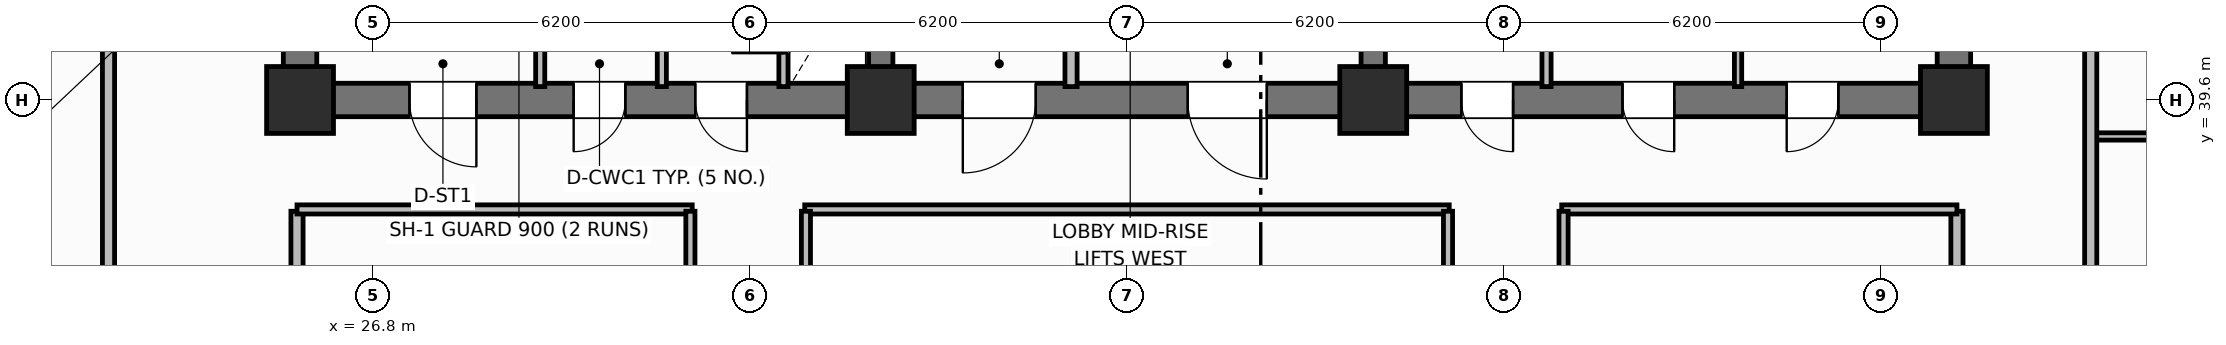
"""IFC4 building model, lengths in metres.
Left out: names, types, materials, properties, quantities, classifications, styles, units other than length and angle.
Written with IfcOpenShell. Run it as: python <this file> out.ifc"""

import sys

from ifc_helpers import new_model, si_unit, direction, frame, frame_2d, origin, origin_2d, place, context, subcontext, project, spatial, rectangle, extrude, element, fill, save


model = new_model("IFC4")
c1 = context("Model", 3, precision=1e-05, world=origin(), true_north=direction((0.0, 1.0)))
c2 = subcontext(c1, "Body", "Model", "MODEL_VIEW")
j1 = project(units=[si_unit("LENGTHUNIT", "METRE"), si_unit("PLANEANGLEUNIT", "RADIAN")], contexts=[c1])
p1 = place(None, origin())
s1 = spatial("IfcSite", under=j1, at=p1, CompositionType="ELEMENT")
p2 = place(p1, origin())
s2 = spatial("IfcBuilding", under=s1, at=p2, CompositionType="ELEMENT")
p3 = place(p2, frame((0.0, 0.0, 129.0)))
s3 = spatial("IfcBuildingStorey", under=s2, at=p3, CompositionType="ELEMENT", Elevation=129.0)
for number, where, z_axis, x_axis in (
    (1, (25.6, 39.875, 0.0), (0.0, 0.0, 1.0), (0.0, 1.0, 0.0)),
    (2, (52.8, 39.875, 0.0), (0.0, 0.0, 1.0), (0.0, 1.0, 0.0)),
):
    element("IfcWall", number, at=place(p3, frame(where, z_axis=z_axis, x_axis=x_axis)), inside=s3, PredefinedType="SHEAR", context=c2, shape_type="SweptSolid", body=[
        extrude(rectangle(XDim=5.65, YDim=0.55, at=frame_2d((2.825, 0.0))), origin(), (0.0, 0.0, 1.0), 3.7),
    ])
p4 = place(p3, frame((52.8, 39.6, 0.0), z_axis=(0.0, 0.0, 1.0), x_axis=(-1.0, 0.0, 0.0)))
e3 = element("IfcWall", 3, at=p4, inside=s3, PredefinedType="SHEAR", context=c2, shape_type="SweptSolid", body=[
    extrude(rectangle(XDim=27.2, YDim=0.55, at=frame_2d((13.6, 0.0))), origin(), (0.0, 0.0, 1.0), 3.7),
])
p5 = place(p4, frame((24.3, 0.0, 0.0)))
e4 = element("IfcOpeningElement", 4, at=p5, cuts=e3, PredefinedType="OPENING", context=c2, shape_type="SweptSolid", body=[
    extrude(rectangle(XDim=1.1, YDim=2.15, at=frame_2d((0.55, 1.075))), frame((0.0, 0.285, 0.0), z_axis=(0.0, -1.0, 0.0), x_axis=(1.0, 0.0, 0.0)), (0.0, 0.0, 1.0), 0.57),
])
p6 = place(p4, frame((21.85, 0.0, 0.0)))
e5 = element("IfcOpeningElement", 5, at=p6, cuts=e3, PredefinedType="OPENING", context=c2, shape_type="SweptSolid", body=[
    extrude(rectangle(XDim=0.85, YDim=2.1, at=frame_2d((0.425, 1.05))), frame((0.0, 0.285, 0.0), z_axis=(0.0, -1.0, 0.0), x_axis=(1.0, 0.0, 0.0)), (0.0, 0.0, 1.0), 0.57),
])
p7 = place(p4, frame((19.85, 0.0, 0.0)))
e6 = element("IfcOpeningElement", 6, at=p7, cuts=e3, PredefinedType="OPENING", context=c2, shape_type="SweptSolid", body=[
    extrude(rectangle(XDim=0.85, YDim=2.1, at=frame_2d((0.425, 1.05))), frame((0.0, 0.285, 0.0), z_axis=(0.0, -1.0, 0.0), x_axis=(1.0, 0.0, 0.0)), (0.0, 0.0, 1.0), 0.57),
])
p8 = place(p4, frame((15.1, 0.0, 0.0)))
e7 = element("IfcOpeningElement", 7, at=p8, cuts=e3, PredefinedType="OPENING", context=c2, shape_type="SweptSolid", body=[
    extrude(rectangle(XDim=1.2, YDim=2.15, at=frame_2d((0.6, 1.075))), frame((0.0, 0.285, 0.0), z_axis=(0.0, -1.0, 0.0), x_axis=(1.0, 0.0, 0.0)), (0.0, 0.0, 1.0), 0.57),
])
p9 = place(p4, frame((11.3, 0.0, 0.0)))
e8 = element("IfcOpeningElement", 8, at=p9, cuts=e3, PredefinedType="OPENING", context=c2, shape_type="SweptSolid", body=[
    extrude(rectangle(XDim=1.3, YDim=2.2, at=frame_2d((0.65, 1.1))), frame((0.0, 0.285, 0.0), z_axis=(0.0, -1.0, 0.0), x_axis=(1.0, 0.0, 0.0)), (0.0, 0.0, 1.0), 0.57),
])
p10 = place(p4, frame((7.25, 0.0, 0.0)))
e9 = element("IfcOpeningElement", 9, at=p10, cuts=e3, PredefinedType="OPENING", context=c2, shape_type="SweptSolid", body=[
    extrude(rectangle(XDim=0.85, YDim=2.1, at=frame_2d((0.425, 1.05))), frame((0.0, 0.285, 0.0), z_axis=(0.0, -1.0, 0.0), x_axis=(1.0, 0.0, 0.0)), (0.0, 0.0, 1.0), 0.57),
])
p11 = place(p4, frame((4.6, 0.0, 0.0)))
e10 = element("IfcOpeningElement", 10, at=p11, cuts=e3, PredefinedType="OPENING", context=c2, shape_type="SweptSolid", body=[
    extrude(rectangle(XDim=0.85, YDim=2.1, at=frame_2d((0.425, 1.05))), frame((0.0, 0.285, 0.0), z_axis=(0.0, -1.0, 0.0), x_axis=(1.0, 0.0, 0.0)), (0.0, 0.0, 1.0), 0.57),
])
p12 = place(p4, frame((1.9, 0.0, 0.0)))
e11 = element("IfcOpeningElement", 11, at=p12, cuts=e3, PredefinedType="OPENING", context=c2, shape_type="SweptSolid", body=[
    extrude(rectangle(XDim=0.85, YDim=2.1, at=frame_2d((0.425, 1.05))), frame((0.0, 0.285, 0.0), z_axis=(0.0, -1.0, 0.0), x_axis=(1.0, 0.0, 0.0)), (0.0, 0.0, 1.0), 0.57),
])
for number, where, z_axis, x_axis in (
    (12, (35.15, 39.875, 0.0), (0.0, 0.0, 1.0), (0.0, 1.0, 0.0)),
    (13, (43.25, 39.875, 0.0), (0.0, 0.0, 1.0), (0.0, 1.0, 0.0)),
):
    element("IfcWall", number, at=place(p3, frame(where, z_axis=z_axis, x_axis=x_axis)), inside=s3, PredefinedType="SHEAR", context=c2, shape_type="SweptSolid", body=[
        extrude(rectangle(XDim=5.65, YDim=0.4, at=frame_2d((2.825, 0.0))), origin(), (0.0, 0.0, 1.0), 3.7),
    ])
for number, where, z_axis, x_axis in (
    (14, (25.6, 39.6, 0.0), (0.0, 0.0, 1.0), (1.0, 0.0, 0.0)),
    (15, (35.15, 39.6, 0.0), (0.0, 0.0, 1.0), (1.0, 0.0, 0.0)),
    (16, (43.25, 39.6, 0.0), (0.0, 0.0, 1.0), (1.0, 0.0, 0.0)),
    (17, (52.8, 39.6, 0.0), (0.0, 0.0, 1.0), (1.0, 0.0, 0.0)),
):
    element("IfcColumn", number, at=place(p3, frame(where, z_axis=z_axis, x_axis=x_axis)), inside=s3, PredefinedType="COLUMN", context=c2, shape_type="SweptSolid", body=[
        extrude(rectangle(XDim=1.1, YDim=1.1, at=origin_2d()), origin(), (0.0, 0.0, 1.0), 3.7),
    ])
p13 = place(p3, frame((33.55, 39.82, 0.0), z_axis=(0.0, 0.0, 1.0), x_axis=(0.0, 1.0, 0.0)))
e18 = element("IfcWall", 18, at=p13, inside=s3, PredefinedType="PARTITIONING", context=c2, shape_type="SweptSolid", body=[
    extrude(rectangle(XDim=2.13, YDim=0.15, at=frame_2d((1.065, 0.0))), origin(), (0.0, 0.0, 1.0), 2.53),
])
p14 = place(p13, frame((0.55, 0.0, 0.0)))
e19 = element("IfcOpeningElement", 19, at=p14, cuts=e18, PredefinedType="OPENING", context=c2, shape_type="SweptSolid", body=[
    extrude(rectangle(XDim=0.85, YDim=2.05, at=frame_2d((0.425, 1.025))), frame((0.0, 0.085, 0.0), z_axis=(0.0, -1.0, 0.0), x_axis=(1.0, 0.0, 0.0)), (0.0, 0.0, 1.0), 0.17),
])
for number, where, z_axis, x_axis in (
    (20, (29.55, 39.82, 0.0), (0.0, 0.0, 1.0), (0.0, 1.0, 0.0)),
    (21, (31.55, 39.82, 0.0), (0.0, 0.0, 1.0), (0.0, 1.0, 0.0)),
):
    element("IfcWall", number, at=place(p3, frame(where, z_axis=z_axis, x_axis=x_axis)), inside=s3, PredefinedType="PARTITIONING", context=c2, shape_type="SweptSolid", body=[
        extrude(rectangle(XDim=2.13, YDim=0.15, at=frame_2d((1.065, 0.0))), origin(), (0.0, 0.0, 1.0), 2.53),
    ])
p15 = place(p3, frame((38.28, 39.82, 0.0), z_axis=(0.0, 0.0, 1.0), x_axis=(0.0, 1.0, 0.0)))
e22 = element("IfcWall", 22, at=p15, inside=s3, PredefinedType="PARTITIONING", context=c2, shape_type="SweptSolid", body=[
    extrude(rectangle(XDim=2.73, YDim=0.2, at=frame_2d((1.365, 0.0))), origin(), (0.0, 0.0, 1.0), 2.53),
])
p16 = place(p3, frame((46.1, 39.82, 0.0), z_axis=(0.0, 0.0, 1.0), x_axis=(0.0, 1.0, 0.0)))
e23 = element("IfcWall", 23, at=p16, inside=s3, PredefinedType="PARTITIONING", context=c2, shape_type="SweptSolid", body=[
    extrude(rectangle(XDim=2.73, YDim=0.15, at=frame_2d((1.365, 0.0))), origin(), (0.0, 0.0, 1.0), 2.53),
])
p17 = place(p3, frame((49.25, 39.82, 0.0), z_axis=(0.0, 0.0, 1.0), x_axis=(0.0, 1.0, 0.0)))
e24 = element("IfcWall", 24, at=p17, inside=s3, PredefinedType="PARTITIONING", context=c2, shape_type="SweptSolid", body=[
    extrude(rectangle(XDim=2.73, YDim=0.12, at=frame_2d((1.365, 0.0))), origin(), (0.0, 0.0, 1.0), 2.53),
])
for number, where, z_axis, x_axis in (
    (25, (25.55, 18.63, 0.0), (0.0, 0.0, 1.0), (0.0, 1.0, 0.0)),
    (26, (52.85, 18.63, 0.0), (0.0, 0.0, 1.0), (0.0, 1.0, 0.0)),
):
    element("IfcWall", number, at=place(p3, frame(where, z_axis=z_axis, x_axis=x_axis)), inside=s3, PredefinedType="PARTITIONING", context=c2, shape_type="SweptSolid", body=[
        extrude(rectangle(XDim=19.14, YDim=0.2, at=frame_2d((9.57, 0.0))), origin(), (0.0, 0.0, 1.0), 2.53),
    ])
p18 = place(p3, frame((25.55, 37.8, 0.0), z_axis=(0.0, 0.0, 1.0), x_axis=(1.0, 0.0, 0.0)))
e27 = element("IfcWall", 27, at=p18, inside=s3, PredefinedType="PARTITIONING", context=c2, shape_type="SweptSolid", body=[
    extrude(rectangle(XDim=6.5, YDim=0.15, at=frame_2d((3.25, 0.0))), origin(), (0.0, 0.0, 1.0), 2.53),
])
p19 = place(p3, frame((33.9, 37.8, 0.0), z_axis=(0.0, 0.0, 1.0), x_axis=(1.0, 0.0, 0.0)))
e28 = element("IfcWall", 28, at=p19, inside=s3, PredefinedType="PARTITIONING", context=c2, shape_type="SweptSolid", body=[
    extrude(rectangle(XDim=10.6, YDim=0.15, at=frame_2d((5.3, 0.0))), origin(), (0.0, 0.0, 1.0), 2.53),
])
p20 = place(p3, frame((46.35, 37.8, 0.0), z_axis=(0.0, 0.0, 1.0), x_axis=(1.0, 0.0, 0.0)))
e29 = element("IfcWall", 29, at=p20, inside=s3, PredefinedType="PARTITIONING", context=c2, shape_type="SweptSolid", body=[
    extrude(rectangle(XDim=6.5, YDim=0.15, at=frame_2d((3.25, 0.0))), origin(), (0.0, 0.0, 1.0), 2.53),
])
p21 = place(p3, frame((32.02, 18.63, 0.0), z_axis=(0.0, 0.0, 1.0), x_axis=(0.0, 1.0, 0.0)))
e30 = element("IfcWall", 30, at=p21, inside=s3, PredefinedType="PARTITIONING", context=c2, shape_type="SweptSolid", body=[
    extrude(rectangle(XDim=19.14, YDim=0.15, at=frame_2d((9.57, 0.0))), origin(), (0.0, 0.0, 1.0), 2.53),
])
p22 = place(p21, frame((5.0, 0.0, 0.0)))
e31 = element("IfcOpeningElement", 31, at=p22, cuts=e30, PredefinedType="OPENING", context=c2, shape_type="SweptSolid", body=[
    extrude(rectangle(XDim=0.9, YDim=2.1, at=frame_2d((0.45, 1.05))), frame((0.0, 0.085, 0.0), z_axis=(0.0, -1.0, 0.0), x_axis=(1.0, 0.0, 0.0)), (0.0, 0.0, 1.0), 0.17),
])
p23 = place(p3, frame((33.92, 18.63, 0.0), z_axis=(0.0, 0.0, 1.0), x_axis=(0.0, 1.0, 0.0)))
e32 = element("IfcWall", 32, at=p23, inside=s3, PredefinedType="PARTITIONING", context=c2, shape_type="SweptSolid", body=[
    extrude(rectangle(XDim=19.14, YDim=0.15, at=frame_2d((9.57, 0.0))), origin(), (0.0, 0.0, 1.0), 2.53),
])
p24 = place(p23, frame((6.5, 0.0, 0.0)))
e33 = element("IfcOpeningElement", 33, at=p24, cuts=e32, PredefinedType="OPENING", context=c2, shape_type="SweptSolid", body=[
    extrude(rectangle(XDim=1.0, YDim=2.15, at=frame_2d((0.5, 1.075))), frame((0.0, 0.085, 0.0), z_axis=(0.0, -1.0, 0.0), x_axis=(1.0, 0.0, 0.0)), (0.0, 0.0, 1.0), 0.17),
])
p25 = place(p3, frame((44.48, 18.63, 0.0), z_axis=(0.0, 0.0, 1.0), x_axis=(0.0, 1.0, 0.0)))
e34 = element("IfcWall", 34, at=p25, inside=s3, PredefinedType="PARTITIONING", context=c2, shape_type="SweptSolid", body=[
    extrude(rectangle(XDim=19.14, YDim=0.15, at=frame_2d((9.57, 0.0))), origin(), (0.0, 0.0, 1.0), 2.53),
])
p26 = place(p3, frame((46.38, 18.63, 0.0), z_axis=(0.0, 0.0, 1.0), x_axis=(0.0, 1.0, 0.0)))
e35 = element("IfcWall", 35, at=p26, inside=s3, PredefinedType="PARTITIONING", context=c2, shape_type="SweptSolid", body=[
    extrude(rectangle(XDim=19.14, YDim=0.15, at=frame_2d((9.57, 0.0))), origin(), (0.0, 0.0, 1.0), 2.53),
])
p27 = place(p26, frame((3.0, 0.0, 0.0)))
e36 = element("IfcOpeningElement", 36, at=p27, cuts=e35, PredefinedType="OPENING", context=c2, shape_type="SweptSolid", body=[
    extrude(rectangle(XDim=0.9, YDim=2.1, at=frame_2d((0.45, 1.05))), frame((0.0, 0.085, 0.0), z_axis=(0.0, -1.0, 0.0), x_axis=(1.0, 0.0, 0.0)), (0.0, 0.0, 1.0), 0.17),
])
p28 = place(p26, frame((11.5, 0.0, 0.0)))
e37 = element("IfcOpeningElement", 37, at=p28, cuts=e35, PredefinedType="OPENING", context=c2, shape_type="SweptSolid", body=[
    extrude(rectangle(XDim=0.9, YDim=2.1, at=frame_2d((0.45, 1.05))), frame((0.0, 0.085, 0.0), z_axis=(0.0, -1.0, 0.0), x_axis=(1.0, 0.0, 0.0)), (0.0, 0.0, 1.0), 0.17),
])
p29 = place(p3, frame((22.45, 10.6, 0.0), z_axis=(0.0, 0.0, 1.0), x_axis=(0.0, 1.0, 0.0)))
e38 = element("IfcWall", 38, at=p29, inside=s3, PredefinedType="PARTITIONING", context=c2, shape_type="SweptSolid", body=[
    extrude(rectangle(XDim=35.2, YDim=0.2, at=frame_2d((17.6, 0.0))), origin(), (0.0, 0.0, 1.0), 2.53),
])
p30 = place(p29, frame((2.65, 0.0, 0.0)))
e39 = element("IfcOpeningElement", 39, at=p30, cuts=e38, PredefinedType="OPENING", context=c2, shape_type="SweptSolid", body=[
    extrude(rectangle(XDim=1.0, YDim=2.15, at=frame_2d((0.5, 1.075))), frame((0.0, 0.11, 0.0), z_axis=(0.0, -1.0, 0.0), x_axis=(1.0, 0.0, 0.0)), (0.0, 0.0, 1.0), 0.22),
])
p31 = place(p29, frame((19.95, 0.0, 0.0)))
e40 = element("IfcOpeningElement", 40, at=p31, cuts=e38, PredefinedType="OPENING", context=c2, shape_type="SweptSolid", body=[
    extrude(rectangle(XDim=1.0, YDim=2.15, at=frame_2d((0.5, 1.075))), frame((0.0, 0.11, 0.0), z_axis=(0.0, -1.0, 0.0), x_axis=(1.0, 0.0, 0.0)), (0.0, 0.0, 1.0), 0.22),
])
p32 = place(p3, frame((55.05, 39.0, 0.0), z_axis=(0.0, 0.0, 1.0), x_axis=(1.0, 0.0, 0.0)))
e41 = element("IfcWall", 41, at=p32, inside=s3, PredefinedType="PARTITIONING", context=c2, shape_type="SweptSolid", body=[
    extrude(rectangle(XDim=2.25, YDim=0.12, at=frame_2d((1.125, 0.0))), origin(), (0.0, 0.0, 1.0), 2.53),
])
p33 = place(p3, frame((55.05, 10.6, 0.0), z_axis=(0.0, 0.0, 1.0), x_axis=(0.0, 1.0, 0.0)))
e42 = element("IfcWall", 42, at=p33, inside=s3, PredefinedType="PARTITIONING", context=c2, shape_type="SweptSolid", body=[
    extrude(rectangle(XDim=35.2, YDim=0.2, at=frame_2d((17.6, 0.0))), origin(), (0.0, 0.0, 1.0), 2.53),
])
p34 = place(p33, frame((2.65, 0.0, 0.0)))
e43 = element("IfcOpeningElement", 43, at=p34, cuts=e42, PredefinedType="OPENING", context=c2, shape_type="SweptSolid", body=[
    extrude(rectangle(XDim=1.0, YDim=2.15, at=frame_2d((0.5, 1.075))), frame((0.0, 0.11, 0.0), z_axis=(0.0, -1.0, 0.0), x_axis=(1.0, 0.0, 0.0)), (0.0, 0.0, 1.0), 0.22),
])
p35 = place(p33, frame((22.75, 0.0, 0.0)))
e44 = element("IfcOpeningElement", 44, at=p35, cuts=e42, PredefinedType="OPENING", context=c2, shape_type="SweptSolid", body=[
    extrude(rectangle(XDim=1.0, YDim=2.15, at=frame_2d((0.5, 1.075))), frame((0.0, 0.11, 0.0), z_axis=(0.0, -1.0, 0.0), x_axis=(1.0, 0.0, 0.0)), (0.0, 0.0, 1.0), 0.22),
])
p36 = place(p14, origin())
e45 = element("IfcDoor", 45, at=p36, inside=s3, OperationType="SINGLE_SWING_LEFT", PredefinedType="TRAPDOOR", context=c2, shape_type="SweptSolid", body=[
    extrude(rectangle(XDim=0.85, YDim=2.05, at=frame_2d((0.425, 1.025))), frame((0.0, 0.025, 0.0), z_axis=(0.0, -1.0, 0.0), x_axis=(1.0, 0.0, 0.0)), (0.0, 0.0, 1.0), 0.05),
])
fill(e19, e45)
p37 = place(p5, origin())
e46 = element("IfcDoor", 46, at=p37, inside=s3, OperationType="SINGLE_SWING_LEFT", PredefinedType="DOOR", context=c2, shape_type="SweptSolid", body=[
    extrude(rectangle(XDim=1.1, YDim=2.15, at=frame_2d((0.55, 1.075))), frame((0.0, 0.025, 0.0), z_axis=(0.0, -1.0, 0.0), x_axis=(1.0, 0.0, 0.0)), (0.0, 0.0, 1.0), 0.05),
])
fill(e4, e46)
p38 = place(p6, origin())
e47 = element("IfcDoor", 47, at=p38, inside=s3, OperationType="SINGLE_SWING_RIGHT", PredefinedType="DOOR", context=c2, shape_type="SweptSolid", body=[
    extrude(rectangle(XDim=0.85, YDim=2.1, at=frame_2d((0.425, 1.05))), frame((0.0, 0.025, 0.0), z_axis=(0.0, -1.0, 0.0), x_axis=(1.0, 0.0, 0.0)), (0.0, 0.0, 1.0), 0.05),
])
fill(e5, e47)
p39 = place(p7, origin())
e48 = element("IfcDoor", 48, at=p39, inside=s3, OperationType="SINGLE_SWING_LEFT", PredefinedType="DOOR", context=c2, shape_type="SweptSolid", body=[
    extrude(rectangle(XDim=0.85, YDim=2.1, at=frame_2d((0.425, 1.05))), frame((0.0, 0.025, 0.0), z_axis=(0.0, -1.0, 0.0), x_axis=(1.0, 0.0, 0.0)), (0.0, 0.0, 1.0), 0.05),
])
fill(e6, e48)
p40 = place(p8, origin())
e49 = element("IfcDoor", 49, at=p40, inside=s3, OperationType="SINGLE_SWING_RIGHT", PredefinedType="DOOR", context=c2, shape_type="SweptSolid", body=[
    extrude(rectangle(XDim=1.2, YDim=2.15, at=frame_2d((0.6, 1.075))), frame((0.0, 0.025, 0.0), z_axis=(0.0, -1.0, 0.0), x_axis=(1.0, 0.0, 0.0)), (0.0, 0.0, 1.0), 0.05),
])
fill(e7, e49)
p41 = place(p9, origin())
e50 = element("IfcDoor", 50, at=p41, inside=s3, OperationType="SINGLE_SWING_LEFT", PredefinedType="DOOR", context=c2, shape_type="SweptSolid", body=[
    extrude(rectangle(XDim=1.3, YDim=2.2, at=frame_2d((0.65, 1.1))), frame((0.0, 0.025, 0.0), z_axis=(0.0, -1.0, 0.0), x_axis=(1.0, 0.0, 0.0)), (0.0, 0.0, 1.0), 0.05),
])
fill(e8, e50)
p42 = place(p10, origin())
e51 = element("IfcDoor", 51, at=p42, inside=s3, OperationType="SINGLE_SWING_LEFT", PredefinedType="DOOR", context=c2, shape_type="SweptSolid", body=[
    extrude(rectangle(XDim=0.85, YDim=2.1, at=frame_2d((0.425, 1.05))), frame((0.0, 0.025, 0.0), z_axis=(0.0, -1.0, 0.0), x_axis=(1.0, 0.0, 0.0)), (0.0, 0.0, 1.0), 0.05),
])
fill(e9, e51)
p43 = place(p11, origin())
e52 = element("IfcDoor", 52, at=p43, inside=s3, OperationType="SINGLE_SWING_LEFT", PredefinedType="DOOR", context=c2, shape_type="SweptSolid", body=[
    extrude(rectangle(XDim=0.85, YDim=2.1, at=frame_2d((0.425, 1.05))), frame((0.0, 0.025, 0.0), z_axis=(0.0, -1.0, 0.0), x_axis=(1.0, 0.0, 0.0)), (0.0, 0.0, 1.0), 0.05),
])
fill(e10, e52)
p44 = place(p12, origin())
e53 = element("IfcDoor", 53, at=p44, inside=s3, OperationType="SINGLE_SWING_RIGHT", PredefinedType="DOOR", context=c2, shape_type="SweptSolid", body=[
    extrude(rectangle(XDim=0.85, YDim=2.1, at=frame_2d((0.425, 1.05))), frame((0.0, 0.025, 0.0), z_axis=(0.0, -1.0, 0.0), x_axis=(1.0, 0.0, 0.0)), (0.0, 0.0, 1.0), 0.05),
])
fill(e11, e53)
save(model, sys.argv[1])
